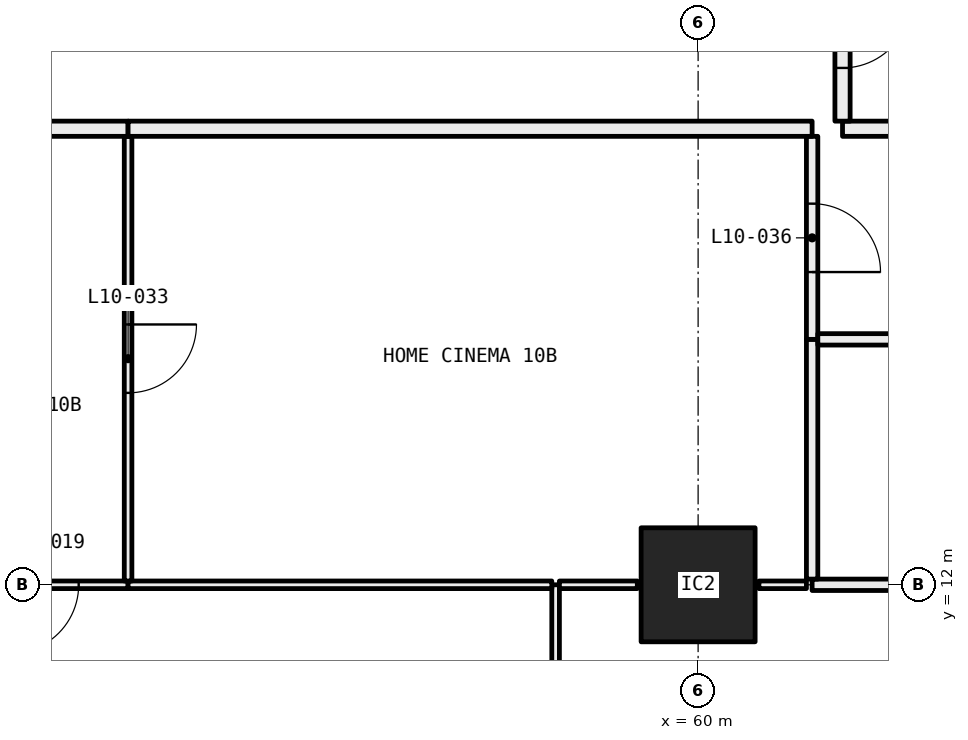
"""IFC4 building model, lengths in metres.
Left out: names, types, materials, properties, quantities, classifications, styles, units other than length and angle.
Written with IfcOpenShell. Run it as: python <this file> out.ifc"""

import sys

from ifc_helpers import new_model, si_unit, direction, frame, frame_2d, origin, origin_2d, place, context, subcontext, project, spatial, rectangle, hollow_rectangle, extrude, element, fill, save


model = new_model("IFC4")
c1 = context("Model", 3, precision=1e-05, world=origin(), true_north=direction((0.0, 1.0)))
c2 = subcontext(c1, "Body", "Model", "MODEL_VIEW")
j1 = project(units=[si_unit("LENGTHUNIT", "METRE"), si_unit("PLANEANGLEUNIT", "RADIAN")], contexts=[c1])
p1 = place(None, origin())
s1 = spatial("IfcSite", under=j1, at=p1, CompositionType="ELEMENT")
p2 = place(p1, origin())
s2 = spatial("IfcBuilding", under=s1, at=p2, CompositionType="ELEMENT")
p3 = place(p2, frame((0.0, 0.0, 47.25)))
s3 = spatial("IfcBuildingStorey", under=s2, at=p3, CompositionType="ELEMENT", Elevation=47.25)
p4 = place(p3, frame((60.0, 12.0, 0.0), z_axis=(0.0, 0.0, 1.0), x_axis=(1.0, 0.0, 0.0)))
e1 = element("IfcColumn", 1, at=p4, inside=s3, PredefinedType="COLUMN", context=c2, shape_type="SweptSolid", body=[
    extrude(hollow_rectangle(XDim=1.5, YDim=1.5, WallThickness=0.065, at=origin_2d()), origin(), (0.0, 0.0, 1.0), 3.05),
])
p5 = place(p3, frame((58.125, 6.05, 0.0), z_axis=(0.0, 0.0, 1.0), x_axis=(0.0, 1.0, 0.0)))
e2 = element("IfcWall", 2, at=p5, inside=s3, PredefinedType="PARTITIONING", context=c2, shape_type="SweptSolid", body=[
    extrude(rectangle(XDim=5.95, YDim=0.1, at=frame_2d((2.975, 0.0))), origin(), (0.0, 0.0, 1.0), 2.45),
])
p6 = place(p5, frame((2.525, 0.0, 0.0)))
e3 = element("IfcOpeningElement", 3, at=p6, cuts=e2, PredefinedType="OPENING", context=c2, shape_type="SweptSolid", body=[
    extrude(rectangle(XDim=0.9, YDim=2.1, at=frame_2d((0.45, 1.05))), frame((0.0, 0.06, 0.0), z_axis=(0.0, -1.0, 0.0), x_axis=(1.0, 0.0, 0.0)), (0.0, 0.0, 1.0), 0.12),
])
p7 = place(p3, frame((52.5, 12.0, 0.0), z_axis=(0.0, 0.0, 1.0), x_axis=(-1.0, 0.0, 0.0)))
e4 = element("IfcWall", 4, at=p7, inside=s3, PredefinedType="PARTITIONING", context=c2, shape_type="SweptSolid", body=[
    extrude(rectangle(XDim=2.2, YDim=0.1, at=frame_2d((1.1, 0.0))), origin(), (0.0, 0.0, 1.0), 2.45),
])
p8 = place(p7, frame((0.65, 0.0, 0.0)))
e5 = element("IfcOpeningElement", 5, at=p8, cuts=e4, PredefinedType="OPENING", context=c2, shape_type="SweptSolid", body=[
    extrude(rectangle(XDim=0.9, YDim=2.1, at=frame_2d((0.45, 1.05))), frame((0.0, 0.06, 0.0), z_axis=(0.0, -1.0, 0.0), x_axis=(1.0, 0.0, 0.0)), (0.0, 0.0, 1.0), 0.12),
])
p9 = place(p3, frame((58.075, 12.0, 0.0), z_axis=(0.0, 0.0, 1.0), x_axis=(-1.0, 0.0, 0.0)))
e6 = element("IfcWall", 6, at=p9, inside=s3, PredefinedType="PARTITIONING", context=c2, shape_type="SweptSolid", body=[
    extrude(rectangle(XDim=5.575, YDim=0.1, at=frame_2d((2.788, 0.0))), origin(), (0.0, 0.0, 1.0), 2.45),
])
p10 = place(p3, frame((59.2, 12.0, 0.0), z_axis=(0.0, 0.0, 1.0), x_axis=(-1.0, 0.0, 0.0)))
e7 = element("IfcWall", 7, at=p10, inside=s3, PredefinedType="PARTITIONING", context=c2, shape_type="SweptSolid", body=[
    extrude(rectangle(XDim=1.025, YDim=0.1, at=frame_2d((0.512, 0.0))), origin(), (0.0, 0.0, 1.0), 2.45),
])
p11 = place(p3, frame((61.425, 12.0, 0.0), z_axis=(0.0, 0.0, 1.0), x_axis=(-1.0, 0.0, 0.0)))
e8 = element("IfcWall", 8, at=p11, inside=s3, PredefinedType="PARTITIONING", context=c2, shape_type="SweptSolid", body=[
    extrude(rectangle(XDim=0.625, YDim=0.1, at=frame_2d((0.312, 0.0))), origin(), (0.0, 0.0, 1.0), 2.45),
])
p12 = place(p3, frame((65.216, 12.0, 0.0), z_axis=(0.0, 0.0, 1.0), x_axis=(-1.0, 0.0, 0.0)))
e9 = element("IfcWall", 9, at=p12, inside=s3, PredefinedType="PARTITIONING", context=c2, shape_type="SweptSolid", body=[
    extrude(rectangle(XDim=3.716, YDim=0.15, at=frame_2d((1.858, 0.0))), origin(), (0.0, 0.0, 1.0), 2.45),
])
p13 = place(p12, frame((1.408, 0.0, 0.0)))
e10 = element("IfcOpeningElement", 10, at=p13, cuts=e9, PredefinedType="OPENING", context=c2, shape_type="SweptSolid", body=[
    extrude(rectangle(XDim=0.9, YDim=2.1, at=frame_2d((0.45, 1.05))), frame((0.0, 0.085, 0.0), z_axis=(0.0, -1.0, 0.0), x_axis=(1.0, 0.0, 0.0)), (0.0, 0.0, 1.0), 0.17),
])
p14 = place(p3, frame((52.5, 12.05, 0.0), z_axis=(0.0, 0.0, 1.0), x_axis=(0.0, 1.0, 0.0)))
e11 = element("IfcWall", 11, at=p14, inside=s3, PredefinedType="PARTITIONING", context=c2, shape_type="SweptSolid", body=[
    extrude(rectangle(XDim=5.85, YDim=0.1, at=frame_2d((2.925, 0.0))), origin(), (0.0, 0.0, 1.0), 2.45),
])
p15 = place(p14, frame((2.475, 0.0, 0.0)))
e12 = element("IfcOpeningElement", 12, at=p15, cuts=e11, PredefinedType="OPENING", context=c2, shape_type="SweptSolid", body=[
    extrude(rectangle(XDim=0.9, YDim=2.1, at=frame_2d((0.45, 1.05))), frame((0.0, 0.06, 0.0), z_axis=(0.0, -1.0, 0.0), x_axis=(1.0, 0.0, 0.0)), (0.0, 0.0, 1.0), 0.12),
])
p16 = place(p3, frame((52.5, 18.0, 0.0), z_axis=(0.0, 0.0, 1.0), x_axis=(-1.0, 0.0, 0.0)))
e13 = element("IfcWall", 13, at=p16, inside=s3, PredefinedType="PARTITIONING", context=c2, shape_type="SweptSolid", body=[
    extrude(rectangle(XDim=4.5, YDim=0.2, at=frame_2d((2.25, 0.0))), origin(), (0.0, 0.0, 1.0), 3.05),
])
p17 = place(p16, frame((1.75, 0.0, 0.0)))
e14 = element("IfcOpeningElement", 14, at=p17, cuts=e13, PredefinedType="OPENING", context=c2, shape_type="SweptSolid", body=[
    extrude(rectangle(XDim=1.0, YDim=2.1, at=frame_2d((0.5, 1.05))), frame((0.0, 0.11, 0.0), z_axis=(0.0, -1.0, 0.0), x_axis=(1.0, 0.0, 0.0)), (0.0, 0.0, 1.0), 0.22),
])
p18 = place(p3, frame((61.5, 12.075, 0.0), z_axis=(0.0, 0.0, 1.0), x_axis=(0.0, 1.0, 0.0)))
e15 = element("IfcWall", 15, at=p18, inside=s3, PredefinedType="PARTITIONING", context=c2, shape_type="SweptSolid", body=[
    extrude(rectangle(XDim=3.154, YDim=0.15, at=frame_2d((1.577, 0.0))), origin(), (0.0, 0.0, 1.0), 2.45),
])
p19 = place(p3, frame((61.5, 15.229, 0.0), z_axis=(0.0, 0.0, 1.0), x_axis=(0.0, 1.0, 0.0)))
e16 = element("IfcWall", 16, at=p19, inside=s3, PredefinedType="PARTITIONING", context=c2, shape_type="SweptSolid", body=[
    extrude(rectangle(XDim=2.671, YDim=0.15, at=frame_2d((1.335, 0.0))), origin(), (0.0, 0.0, 1.0), 3.05),
])
p20 = place(p19, frame((0.885, 0.0, 0.0)))
e17 = element("IfcOpeningElement", 17, at=p20, cuts=e16, PredefinedType="OPENING", context=c2, shape_type="SweptSolid", body=[
    extrude(rectangle(XDim=0.9, YDim=2.1, at=frame_2d((0.45, 1.05))), frame((0.0, 0.085, 0.0), z_axis=(0.0, -1.0, 0.0), x_axis=(1.0, 0.0, 0.0)), (0.0, 0.0, 1.0), 0.17),
])
p21 = place(p3, frame((61.5, 18.0, 0.0), z_axis=(0.0, 0.0, 1.0), x_axis=(-1.0, 0.0, 0.0)))
e18 = element("IfcWall", 18, at=p21, inside=s3, PredefinedType="PARTITIONING", context=c2, shape_type="SweptSolid", body=[
    extrude(rectangle(XDim=9.0, YDim=0.2, at=frame_2d((4.5, 0.0))), origin(), (0.0, 0.0, 1.0), 3.05),
])
p22 = place(p3, frame((65.141, 15.229, 0.0), z_axis=(0.0, 0.0, 1.0), x_axis=(-1.0, 0.0, 0.0)))
e19 = element("IfcWall", 19, at=p22, inside=s3, PredefinedType="PARTITIONING", context=c2, shape_type="SweptSolid", body=[
    extrude(rectangle(XDim=3.566, YDim=0.15, at=frame_2d((1.783, 0.0))), origin(), (0.0, 0.0, 1.0), 3.05),
])
p23 = place(p3, frame((64.15, 18.0, 0.0), z_axis=(0.0, 0.0, 1.0), x_axis=(-1.0, 0.0, 0.0)))
e20 = element("IfcWall", 20, at=p23, inside=s3, PredefinedType="PARTITIONING", context=c2, shape_type="SweptSolid", body=[
    extrude(rectangle(XDim=2.25, YDim=0.2, at=frame_2d((1.125, 0.0))), origin(), (0.0, 0.0, 1.0), 3.05),
])
p24 = place(p3, frame((61.9, 20.4, 0.0), z_axis=(0.0, 0.0, 1.0), x_axis=(0.0, -1.0, 0.0)))
e21 = element("IfcWall", 21, at=p24, inside=s3, PredefinedType="PARTITIONING", context=c2, shape_type="SweptSolid", body=[
    extrude(rectangle(XDim=2.3, YDim=0.2, at=frame_2d((1.15, 0.0))), origin(), (0.0, 0.0, 1.0), 3.05),
])
p25 = place(p24, frame((0.7, 0.0, 0.0)))
e22 = element("IfcOpeningElement", 22, at=p25, cuts=e21, PredefinedType="OPENING", context=c2, shape_type="SweptSolid", body=[
    extrude(rectangle(XDim=0.9, YDim=2.1, at=frame_2d((0.45, 1.05))), frame((0.0, 0.11, 0.0), z_axis=(0.0, -1.0, 0.0), x_axis=(1.0, 0.0, 0.0)), (0.0, 0.0, 1.0), 0.22),
])
p26 = place(p8, origin())
e23 = element("IfcDoor", 23, at=p26, inside=s3, OperationType="SINGLE_SWING_LEFT", PredefinedType="DOOR", context=c2, shape_type="SweptSolid", body=[
    extrude(rectangle(XDim=0.9, YDim=2.1, at=frame_2d((0.45, 1.05))), frame((0.0, 0.025, 0.0), z_axis=(0.0, -1.0, 0.0), x_axis=(1.0, 0.0, 0.0)), (0.0, 0.0, 1.0), 0.05),
])
fill(e5, e23)
p27 = place(p15, frame((0.9, 0.0, 0.0), x_axis=(-1.0, 0.0, 0.0)))
e24 = element("IfcDoor", 24, at=p27, inside=s3, OperationType="SINGLE_SWING_RIGHT", PredefinedType="DOOR", context=c2, shape_type="SweptSolid", body=[
    extrude(rectangle(XDim=0.9, YDim=2.1, at=frame_2d((0.45, 1.05))), frame((0.0, 0.025, 0.0), z_axis=(0.0, -1.0, 0.0), x_axis=(1.0, 0.0, 0.0)), (0.0, 0.0, 1.0), 0.05),
])
fill(e12, e24)
p28 = place(p20, frame((0.9, 0.0, 0.0), x_axis=(-1.0, 0.0, 0.0)))
e25 = element("IfcDoor", 25, at=p28, inside=s3, OperationType="SINGLE_SWING_LEFT", PredefinedType="DOOR", context=c2, shape_type="SweptSolid", body=[
    extrude(rectangle(XDim=0.9, YDim=2.1, at=frame_2d((0.45, 1.05))), frame((0.0, 0.025, 0.0), z_axis=(0.0, -1.0, 0.0), x_axis=(1.0, 0.0, 0.0)), (0.0, 0.0, 1.0), 0.05),
])
fill(e17, e25)
p29 = place(p25, origin())
e26 = element("IfcDoor", 26, at=p29, inside=s3, OperationType="SINGLE_SWING_RIGHT", PredefinedType="DOOR", context=c2, shape_type="SweptSolid", body=[
    extrude(rectangle(XDim=0.9, YDim=2.1, at=frame_2d((0.45, 1.05))), frame((0.0, 0.025, 0.0), z_axis=(0.0, -1.0, 0.0), x_axis=(1.0, 0.0, 0.0)), (0.0, 0.0, 1.0), 0.05),
])
fill(e22, e26)
save(model, sys.argv[1])
